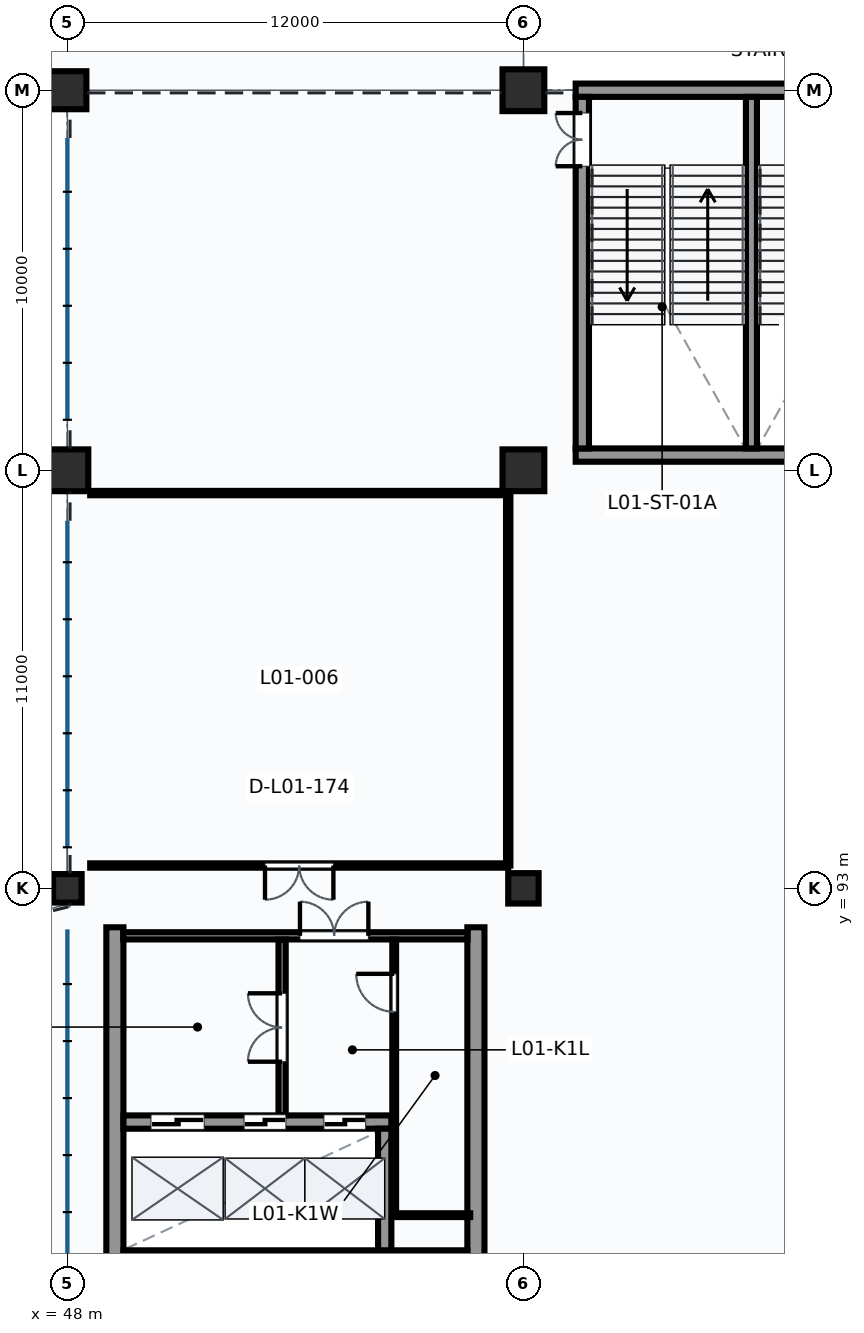
"""IFC4 building model, lengths in metres.
Left out: names, types, materials, properties, quantities, classifications, styles, units other than length and angle.
Written with IfcOpenShell. Run it as: python <this file> out.ifc"""

import sys

from ifc_helpers import new_model, si_unit, direction, frame, frame_2d, origin, origin_2d, place, context, subcontext, project, spatial, rectangle, circle, extrude, element, fill, save


model = new_model("IFC4")
c1 = context("Model", 3, precision=1e-05, world=origin(), true_north=direction((0.0, 1.0)))
c2 = subcontext(c1, "Body", "Model", "MODEL_VIEW")
j1 = project(units=[si_unit("LENGTHUNIT", "METRE"), si_unit("PLANEANGLEUNIT", "RADIAN")], contexts=[c1])
p1 = place(None, origin())
s1 = spatial("IfcSite", under=j1, at=p1, CompositionType="ELEMENT")
p2 = place(p1, origin())
s2 = spatial("IfcBuilding", under=s1, at=p2, CompositionType="ELEMENT")
p3 = place(p2, frame((0.0, 0.0, 5.4)))
s3 = spatial("IfcBuildingStorey", under=s2, at=p3, CompositionType="ELEMENT", Elevation=5.4)
p4 = place(p3, frame((48.0, 93.0, 0.0), z_axis=(0.0, 0.0, 1.0), x_axis=(1.0, 0.0, 0.0)))
e1 = element("IfcColumn", 1, at=p4, inside=s3, PredefinedType="COLUMN", context=c2, shape_type="SweptSolid", body=[
    extrude(rectangle(XDim=0.75, YDim=0.75, at=origin_2d()), origin(), (0.0, 0.0, 1.0), 4.8),
])
p5 = place(p3, frame((48.0, 104.0, 0.0), z_axis=(0.0, 0.0, 1.0), x_axis=(1.0, 0.0, 0.0)))
e2 = element("IfcColumn", 2, at=p5, inside=s3, PredefinedType="COLUMN", context=c2, shape_type="SweptSolid", body=[
    extrude(rectangle(XDim=1.1, YDim=1.1, at=origin_2d()), origin(), (0.0, 0.0, 1.0), 4.8),
])
p6 = place(p3, frame((48.0, 114.0, 0.0), z_axis=(0.0, 0.0, 1.0), x_axis=(1.0, 0.0, 0.0)))
e3 = element("IfcColumn", 3, at=p6, inside=s3, PredefinedType="COLUMN", context=c2, shape_type="SweptSolid", body=[
    extrude(rectangle(XDim=1.0, YDim=1.0, at=origin_2d()), origin(), (0.0, 0.0, 1.0), 4.8),
])
p7 = place(p3, frame((60.0, 93.0, 0.0), z_axis=(0.0, 0.0, 1.0), x_axis=(1.0, 0.0, 0.0)))
e4 = element("IfcColumn", 4, at=p7, inside=s3, PredefinedType="COLUMN", context=c2, shape_type="SweptSolid", body=[
    extrude(circle(Radius=0.4, at=origin_2d()), origin(), (0.0, 0.0, 1.0), 4.8),
])
for number, where, z_axis, x_axis in (
    (5, (60.0, 104.0, 0.0), (0.0, 0.0, 1.0), (1.0, 0.0, 0.0)),
    (6, (60.0, 114.0, 0.0), (0.0, 0.0, 1.0), (1.0, 0.0, 0.0)),
):
    element("IfcColumn", number, at=place(p3, frame(where, z_axis=z_axis, x_axis=x_axis)), inside=s3, PredefinedType="COLUMN", context=c2, shape_type="SweptSolid", body=[
        extrude(rectangle(XDim=1.1, YDim=1.1, at=origin_2d()), origin(), (0.0, 0.0, 1.0), 4.8),
    ])
p8 = place(p3, frame((61.375, 104.4, 0.0), z_axis=(0.0, 0.0, 1.0), x_axis=(1.0, 0.0, 0.0)))
e7 = element("IfcWall", 7, at=p8, inside=s3, PredefinedType="SHEAR", context=c2, shape_type="SweptSolid", body=[
    extrude(rectangle(XDim=9.25, YDim=0.35, at=frame_2d((4.625, 0.0))), origin(), (0.0, 0.0, 1.0), 4.8),
])
p9 = place(p3, frame((61.375, 114.0, 0.0), z_axis=(0.0, 0.0, 1.0), x_axis=(1.0, 0.0, 0.0)))
e8 = element("IfcWall", 8, at=p9, inside=s3, PredefinedType="SHEAR", context=c2, shape_type="SweptSolid", body=[
    extrude(rectangle(XDim=9.25, YDim=0.35, at=frame_2d((4.625, 0.0))), origin(), (0.0, 0.0, 1.0), 3.906),
])
p10 = place(p3, frame((61.55, 104.575, 0.0), z_axis=(0.0, 0.0, 1.0), x_axis=(0.0, 1.0, 0.0)))
e9 = element("IfcWall", 9, at=p10, inside=s3, PredefinedType="SHEAR", context=c2, shape_type="SweptSolid", body=[
    extrude(rectangle(XDim=9.25, YDim=0.35, at=frame_2d((4.625, 0.0))), origin(), (0.0, 0.0, 1.0), 4.8),
])
p11 = place(p10, frame((7.425, 0.0, 0.0)))
e10 = element("IfcOpeningElement", 10, at=p11, cuts=e9, PredefinedType="OPENING", context=c2, shape_type="SweptSolid", body=[
    extrude(rectangle(XDim=1.4, YDim=2.2, at=frame_2d((0.7, 1.1))), frame((0.0, 0.185, 0.0), z_axis=(0.0, -1.0, 0.0), x_axis=(1.0, 0.0, 0.0)), (0.0, 0.0, 1.0), 0.37),
])
p12 = place(p3, frame((66.0, 104.575, 0.0), z_axis=(0.0, 0.0, 1.0), x_axis=(0.0, 1.0, 0.0)))
e11 = element("IfcWall", 11, at=p12, inside=s3, PredefinedType="SHEAR", context=c2, shape_type="SweptSolid", body=[
    extrude(rectangle(XDim=9.25, YDim=0.29, at=frame_2d((4.625, 0.0))), origin(), (0.0, 0.0, 1.0), 4.8),
])
for number, where, z_axis, x_axis in (
    (12, (49.25, 83.025, 0.0), (0.0, 0.0, 1.0), (0.0, 1.0, 0.0)),
    (13, (58.75, 83.025, 0.0), (0.0, 0.0, 1.0), (0.0, 1.0, 0.0)),
):
    element("IfcWall", number, at=place(p3, frame(where, z_axis=z_axis, x_axis=x_axis)), inside=s3, PredefinedType="SHEAR", context=c2, shape_type="SweptSolid", body=[
        extrude(rectangle(XDim=8.95, YDim=0.45, at=frame_2d((4.475, 0.0))), origin(), (0.0, 0.0, 1.0), 4.8),
    ])
p13 = place(p3, frame((49.475, 83.25, 0.0), z_axis=(0.0, 0.0, 1.0), x_axis=(1.0, 0.0, 0.0)))
e14 = element("IfcWall", 14, at=p13, inside=s3, PredefinedType="SHEAR", context=c2, shape_type="SweptSolid", body=[
    extrude(rectangle(XDim=9.05, YDim=0.45, at=frame_2d((4.525, 0.0))), origin(), (0.0, 0.0, 1.0), 4.8),
])
p14 = place(p3, frame((49.475, 86.85, 0.0), z_axis=(0.0, 0.0, 1.0), x_axis=(1.0, 0.0, 0.0)))
e15 = element("IfcWall", 15, at=p14, inside=s3, PredefinedType="SHEAR", context=c2, shape_type="SweptSolid", body=[
    extrude(rectangle(XDim=7.05, YDim=0.35, at=frame_2d((3.525, 0.0))), origin(), (0.0, 0.0, 1.0), 4.8),
])
p15 = place(p14, frame((0.725, 0.0, 0.0)))
e16 = element("IfcOpeningElement", 16, at=p15, cuts=e15, PredefinedType="OPENING", context=c2, shape_type="SweptSolid", body=[
    extrude(rectangle(XDim=1.4, YDim=2.3, at=frame_2d((0.7, 1.15))), frame((0.0, 0.185, 0.0), z_axis=(0.0, -1.0, 0.0), x_axis=(1.0, 0.0, 0.0)), (0.0, 0.0, 1.0), 0.37),
])
p16 = place(p14, frame((3.175, 0.0, 0.0)))
e17 = element("IfcOpeningElement", 17, at=p16, cuts=e15, PredefinedType="OPENING", context=c2, shape_type="SweptSolid", body=[
    extrude(rectangle(XDim=1.1, YDim=2.2, at=frame_2d((0.55, 1.1))), frame((0.0, 0.185, 0.0), z_axis=(0.0, -1.0, 0.0), x_axis=(1.0, 0.0, 0.0)), (0.0, 0.0, 1.0), 0.37),
])
p17 = place(p14, frame((5.275, 0.0, 0.0)))
e18 = element("IfcOpeningElement", 18, at=p17, cuts=e15, PredefinedType="OPENING", context=c2, shape_type="SweptSolid", body=[
    extrude(rectangle(XDim=1.1, YDim=2.2, at=frame_2d((0.55, 1.1))), frame((0.0, 0.185, 0.0), z_axis=(0.0, -1.0, 0.0), x_axis=(1.0, 0.0, 0.0)), (0.0, 0.0, 1.0), 0.37),
])
p18 = place(p3, frame((56.35, 83.475, 0.0), z_axis=(0.0, 0.0, 1.0), x_axis=(0.0, 1.0, 0.0)))
e19 = element("IfcWall", 19, at=p18, inside=s3, PredefinedType="SHEAR", context=c2, shape_type="SweptSolid", body=[
    extrude(rectangle(XDim=3.2, YDim=0.35, at=frame_2d((1.6, 0.0))), origin(), (0.0, 0.0, 1.0), 4.8),
])
p19 = place(p3, frame((49.47, 91.75, 0.0), z_axis=(0.0, 0.0, 1.0), x_axis=(1.0, 0.0, 0.0)))
e20 = element("IfcWall", 20, at=p19, inside=s3, PredefinedType="PARTITIONING", context=c2, shape_type="SweptSolid", body=[
    extrude(rectangle(XDim=9.06, YDim=0.19, at=frame_2d((4.53, 0.0))), origin(), (0.0, 0.0, 1.0), 4.47),
])
p20 = place(p19, frame((4.65, 0.0, 0.0)))
e21 = element("IfcOpeningElement", 21, at=p20, cuts=e20, PredefinedType="OPENING", context=c2, shape_type="SweptSolid", body=[
    extrude(rectangle(XDim=1.8, YDim=2.3, at=frame_2d((0.9, 1.15))), frame((0.0, 0.105, 0.0), z_axis=(0.0, -1.0, 0.0), x_axis=(1.0, 0.0, 0.0)), (0.0, 0.0, 1.0), 0.21),
])
p21 = place(p3, frame((53.65, 87.025, 0.0), z_axis=(0.0, 0.0, 1.0), x_axis=(0.0, 1.0, 0.0)))
e22 = element("IfcWall", 22, at=p21, inside=s3, PredefinedType="PARTITIONING", context=c2, shape_type="SweptSolid", body=[
    extrude(rectangle(XDim=4.625, YDim=0.19, at=frame_2d((2.312, 0.0))), origin(), (0.0, 0.0, 1.0), 4.47),
])
p22 = place(p21, frame((1.413, 0.0, 0.0)))
e23 = element("IfcOpeningElement", 23, at=p22, cuts=e22, PredefinedType="OPENING", context=c2, shape_type="SweptSolid", body=[
    extrude(rectangle(XDim=1.8, YDim=2.2, at=frame_2d((0.9, 1.1))), frame((0.0, 0.105, 0.0), z_axis=(0.0, -1.0, 0.0), x_axis=(1.0, 0.0, 0.0)), (0.0, 0.0, 1.0), 0.21),
])
p23 = place(p3, frame((56.6, 84.4, 0.0), z_axis=(0.0, 0.0, 1.0), x_axis=(0.0, 1.0, 0.0)))
e24 = element("IfcWall", 24, at=p23, inside=s3, PredefinedType="PARTITIONING", context=c2, shape_type="SweptSolid", body=[
    extrude(rectangle(XDim=7.25, YDim=0.1, at=frame_2d((3.625, 0.0))), origin(), (0.0, 0.0, 1.0), 4.47),
])
p24 = place(p23, frame((5.35, 0.0, 0.0)))
e25 = element("IfcOpeningElement", 25, at=p24, cuts=e24, PredefinedType="OPENING", context=c2, shape_type="SweptSolid", body=[
    extrude(rectangle(XDim=1.0, YDim=2.1, at=frame_2d((0.5, 1.05))), frame((0.0, 0.06, 0.0), z_axis=(0.0, -1.0, 0.0), x_axis=(1.0, 0.0, 0.0)), (0.0, 0.0, 1.0), 0.12),
])
p25 = place(p3, frame((56.6, 84.4, 0.0), z_axis=(0.0, 0.0, 1.0), x_axis=(1.0, 0.0, 0.0)))
e26 = element("IfcWall", 26, at=p25, inside=s3, PredefinedType="PARTITIONING", context=c2, shape_type="SweptSolid", body=[
    extrude(rectangle(XDim=2.0, YDim=0.1, at=frame_2d((1.0, 0.0))), origin(), (0.0, 0.0, 1.0), 4.47),
])
p26 = place(p3, frame((59.6, 103.4, 0.0), z_axis=(0.0, 0.0, 1.0), x_axis=(0.0, -1.0, 0.0)))
e27 = element("IfcWall", 27, at=p26, inside=s3, PredefinedType="PARTITIONING", context=c2, shape_type="SweptSolid", body=[
    extrude(rectangle(XDim=9.8, YDim=0.115, at=frame_2d((4.9, 0.0))), origin(), (0.0, 0.0, 1.0), 4.033),
])
p27 = place(p3, frame((59.6, 93.6, 0.0), z_axis=(0.0, 0.0, 1.0), x_axis=(-1.0, 0.0, 0.0)))
e28 = element("IfcWall", 28, at=p27, inside=s3, PredefinedType="PARTITIONING", context=c2, shape_type="SweptSolid", body=[
    extrude(rectangle(XDim=11.0, YDim=0.115, at=frame_2d((5.5, 0.0))), origin(), (0.0, 0.0, 1.0), 4.47),
])
p28 = place(p27, frame((4.6, 0.0, 0.0)))
e29 = element("IfcOpeningElement", 29, at=p28, cuts=e28, PredefinedType="OPENING", context=c2, shape_type="SweptSolid", body=[
    extrude(rectangle(XDim=1.8, YDim=2.3, at=frame_2d((0.9, 1.15))), frame((0.0, 0.067, 0.0), z_axis=(0.0, -1.0, 0.0), x_axis=(1.0, 0.0, 0.0)), (0.0, 0.0, 1.0), 0.135),
])
p29 = place(p3, frame((48.6, 103.4, 0.0), z_axis=(0.0, 0.0, 1.0), x_axis=(1.0, 0.0, 0.0)))
e30 = element("IfcWall", 30, at=p29, inside=s3, PredefinedType="PARTITIONING", context=c2, shape_type="SweptSolid", body=[
    extrude(rectangle(XDim=11.0, YDim=0.115, at=frame_2d((5.5, 0.0))), origin(), (0.0, 0.0, 1.0), 4.47),
])
p30 = place(p11, frame((1.4, 0.0, 0.0), z_axis=(0.0, 0.0, 1.0), x_axis=(-1.0, 0.0, 0.0)))
e31 = element("IfcDoor", 31, at=p30, inside=s3, OperationType="DOUBLE_DOOR_SINGLE_SWING", PredefinedType="DOOR", context=c2, shape_type="SweptSolid", body=[
    extrude(rectangle(XDim=1.4, YDim=2.2, at=frame_2d((0.7, 1.1))), frame((0.0, 0.025, 0.0), z_axis=(0.0, -1.0, 0.0), x_axis=(1.0, 0.0, 0.0)), (0.0, 0.0, 1.0), 0.05),
])
fill(e10, e31)
p31 = place(p15, origin())
e32 = element("IfcDoor", 32, at=p31, inside=s3, OperationType="SLIDING_TO_LEFT", PredefinedType="DOOR", context=c2, shape_type="SweptSolid", body=[
    extrude(rectangle(XDim=1.4, YDim=2.3, at=frame_2d((0.7, 1.15))), frame((0.0, 0.025, 0.0), z_axis=(0.0, -1.0, 0.0), x_axis=(1.0, 0.0, 0.0)), (0.0, 0.0, 1.0), 0.05),
])
fill(e16, e32)
p32 = place(p16, origin())
e33 = element("IfcDoor", 33, at=p32, inside=s3, OperationType="SLIDING_TO_LEFT", PredefinedType="DOOR", context=c2, shape_type="SweptSolid", body=[
    extrude(rectangle(XDim=1.1, YDim=2.2, at=frame_2d((0.55, 1.1))), frame((0.0, 0.025, 0.0), z_axis=(0.0, -1.0, 0.0), x_axis=(1.0, 0.0, 0.0)), (0.0, 0.0, 1.0), 0.05),
])
fill(e17, e33)
p33 = place(p17, origin())
e34 = element("IfcDoor", 34, at=p33, inside=s3, OperationType="SLIDING_TO_LEFT", PredefinedType="DOOR", context=c2, shape_type="SweptSolid", body=[
    extrude(rectangle(XDim=1.1, YDim=2.2, at=frame_2d((0.55, 1.1))), frame((0.0, 0.025, 0.0), z_axis=(0.0, -1.0, 0.0), x_axis=(1.0, 0.0, 0.0)), (0.0, 0.0, 1.0), 0.05),
])
fill(e18, e34)
p34 = place(p20, origin())
e35 = element("IfcDoor", 35, at=p34, inside=s3, OperationType="DOUBLE_DOOR_SINGLE_SWING", PredefinedType="DOOR", context=c2, shape_type="SweptSolid", body=[
    extrude(rectangle(XDim=1.8, YDim=2.3, at=frame_2d((0.9, 1.15))), frame((0.0, 0.025, 0.0), z_axis=(0.0, -1.0, 0.0), x_axis=(1.0, 0.0, 0.0)), (0.0, 0.0, 1.0), 0.05),
])
fill(e21, e35)
p35 = place(p22, origin())
e36 = element("IfcDoor", 36, at=p35, inside=s3, OperationType="DOUBLE_DOOR_SINGLE_SWING", PredefinedType="DOOR", context=c2, shape_type="SweptSolid", body=[
    extrude(rectangle(XDim=1.8, YDim=2.2, at=frame_2d((0.9, 1.1))), frame((0.0, 0.025, 0.0), z_axis=(0.0, -1.0, 0.0), x_axis=(1.0, 0.0, 0.0)), (0.0, 0.0, 1.0), 0.05),
])
fill(e23, e36)
p36 = place(p24, origin())
e37 = element("IfcDoor", 37, at=p36, inside=s3, OperationType="SINGLE_SWING_RIGHT", PredefinedType="DOOR", context=c2, shape_type="SweptSolid", body=[
    extrude(rectangle(XDim=1.0, YDim=2.1, at=frame_2d((0.5, 1.05))), frame((0.0, 0.025, 0.0), z_axis=(0.0, -1.0, 0.0), x_axis=(1.0, 0.0, 0.0)), (0.0, 0.0, 1.0), 0.05),
])
fill(e25, e37)
p37 = place(p28, origin())
e38 = element("IfcDoor", 38, at=p37, inside=s3, OperationType="DOUBLE_DOOR_SINGLE_SWING", PredefinedType="DOOR", context=c2, shape_type="SweptSolid", body=[
    extrude(rectangle(XDim=1.8, YDim=2.3, at=frame_2d((0.9, 1.15))), frame((0.0, 0.025, 0.0), z_axis=(0.0, -1.0, 0.0), x_axis=(1.0, 0.0, 0.0)), (0.0, 0.0, 1.0), 0.05),
])
fill(e29, e38)
save(model, sys.argv[1])
